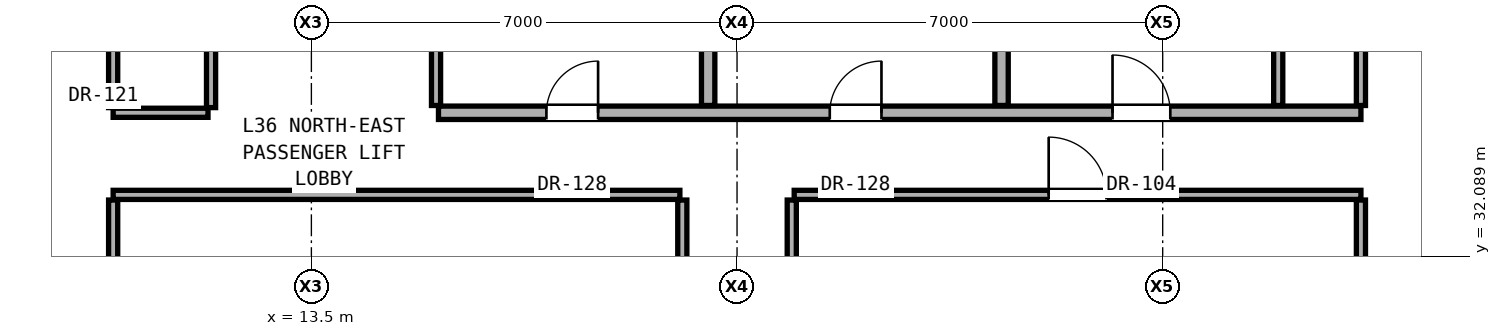
"""IFC4 building model, lengths in metres.
Left out: names, types, materials, properties, quantities, classifications, styles, units other than length and angle.
Written with IfcOpenShell. Run it as: python <this file> out.ifc"""

import sys

from ifc_helpers import new_model, si_unit, direction, frame, frame_2d, origin, place, context, subcontext, project, spatial, rectangle, extrude, element, fill, save


model = new_model("IFC4")
c1 = context("Model", 3, precision=1e-05, world=origin(), true_north=direction((0.0, 1.0)))
c2 = subcontext(c1, "Body", "Model", "MODEL_VIEW")
j1 = project(units=[si_unit("LENGTHUNIT", "METRE"), si_unit("PLANEANGLEUNIT", "RADIAN")], contexts=[c1])
p1 = place(None, origin())
s1 = spatial("IfcSite", under=j1, at=p1, CompositionType="ELEMENT")
p2 = place(p1, origin())
s2 = spatial("IfcBuilding", under=s1, at=p2, CompositionType="ELEMENT")
p3 = place(p2, frame((0.0, 0.0, 128.0)))
s3 = spatial("IfcBuildingStorey", under=s2, at=p3, CompositionType="ELEMENT", Elevation=128.0)
p4 = place(p3, frame((10.24, 33.1, 0.0), z_axis=(0.0, 0.0, 1.0), x_axis=(1.0, 0.0, 0.0)))
e1 = element("IfcWall", 1, at=p4, inside=s3, PredefinedType="PARTITIONING", context=c2, shape_type="SweptSolid", body=[
    extrude(rectangle(XDim=9.32, YDim=0.15, at=frame_2d((4.66, 0.0))), origin(), (0.0, 0.0, 1.0), 2.216),
])
p5 = place(p3, frame((21.44, 33.1, 0.0), z_axis=(0.0, 0.0, 1.0), x_axis=(1.0, 0.0, 0.0)))
e2 = element("IfcWall", 2, at=p5, inside=s3, PredefinedType="PARTITIONING", context=c2, shape_type="SweptSolid", body=[
    extrude(rectangle(XDim=9.32, YDim=0.15, at=frame_2d((4.66, 0.0))), origin(), (0.0, 0.0, 1.0), 2.216),
])
p6 = place(p5, frame((4.185, 0.0, 0.0)))
e3 = element("IfcOpeningElement", 3, at=p6, cuts=e2, PredefinedType="OPENING", context=c2, shape_type="SweptSolid", body=[
    extrude(rectangle(XDim=0.95, YDim=2.15, at=frame_2d((0.475, 1.075))), frame((0.0, 0.085, 0.0), z_axis=(0.0, -1.0, 0.0), x_axis=(1.0, 0.0, 0.0)), (0.0, 0.0, 1.0), 0.17),
])
p7 = place(p3, frame((10.24, 34.45, 0.0), z_axis=(0.0, 0.0, 1.0), x_axis=(1.0, 0.0, 0.0)))
e4 = element("IfcWall", 4, at=p7, inside=s3, PredefinedType="PARTITIONING", context=c2, shape_type="SweptSolid", body=[
    extrude(rectangle(XDim=1.56, YDim=0.15, at=frame_2d((0.78, 0.0))), origin(), (0.0, 0.0, 1.0), 2.216),
])
p8 = place(p3, frame((15.59, 34.45, 0.0), z_axis=(0.0, 0.0, 1.0), x_axis=(1.0, 0.0, 0.0)))
e5 = element("IfcWall", 5, at=p8, inside=s3, PredefinedType="SOLIDWALL", context=c2, shape_type="SweptSolid", body=[
    extrude(rectangle(XDim=15.17, YDim=0.22, at=frame_2d((7.585, 0.0))), origin(), (0.0, 0.0, 1.0), 2.216),
])
p9 = place(p8, frame((6.435, 0.0, 0.0)))
e6 = element("IfcOpeningElement", 6, at=p9, cuts=e5, PredefinedType="OPENING", context=c2, shape_type="SweptSolid", body=[
    extrude(rectangle(XDim=0.85, YDim=2.01, at=frame_2d((0.425, 1.005))), frame((0.0, 0.12, 0.0), z_axis=(0.0, -1.0, 0.0), x_axis=(1.0, 0.0, 0.0)), (0.0, 0.0, 1.0), 0.24),
])
p10 = place(p8, frame((11.085, 0.0, 0.0)))
e7 = element("IfcOpeningElement", 7, at=p10, cuts=e5, PredefinedType="OPENING", context=c2, shape_type="SweptSolid", body=[
    extrude(rectangle(XDim=0.95, YDim=2.15, at=frame_2d((0.475, 1.075))), frame((0.0, 0.12, 0.0), z_axis=(0.0, -1.0, 0.0), x_axis=(1.0, 0.0, 0.0)), (0.0, 0.0, 1.0), 0.24),
])
p11 = place(p8, frame((1.775, 0.0, 0.0)))
e8 = element("IfcOpeningElement", 8, at=p11, cuts=e5, PredefinedType="OPENING", context=c2, shape_type="SweptSolid", body=[
    extrude(rectangle(XDim=0.85, YDim=2.01, at=frame_2d((0.425, 1.005))), frame((0.0, 0.12, 0.0), z_axis=(0.0, -1.0, 0.0), x_axis=(1.0, 0.0, 0.0)), (0.0, 0.0, 1.0), 0.24),
])
p12 = place(p3, frame((10.24, 27.485, 0.0), z_axis=(0.0, 0.0, 1.0), x_axis=(0.0, 1.0, 0.0)))
e9 = element("IfcWall", 9, at=p12, inside=s3, PredefinedType="PARTITIONING", context=c2, shape_type="SweptSolid", body=[
    extrude(rectangle(XDim=5.53, YDim=0.15, at=frame_2d((2.765, 0.0))), origin(), (0.0, 0.0, 1.0), 2.299),
])
p13 = place(p12, frame((2.29, 0.0, 0.0)))
e10 = element("IfcOpeningElement", 10, at=p13, cuts=e9, PredefinedType="OPENING", context=c2, shape_type="SweptSolid", body=[
    extrude(rectangle(XDim=0.95, YDim=2.15, at=frame_2d((0.475, 1.075))), frame((0.0, 0.085, 0.0), z_axis=(0.0, -1.0, 0.0), x_axis=(1.0, 0.0, 0.0)), (0.0, 0.0, 1.0), 0.17),
])
p14 = place(p3, frame((10.24, 34.535, 0.0), z_axis=(0.0, 0.0, 1.0), x_axis=(0.0, 1.0, 0.0)))
e11 = element("IfcWall", 11, at=p14, inside=s3, PredefinedType="PARTITIONING", context=c2, shape_type="SweptSolid", body=[
    extrude(rectangle(XDim=9.13, YDim=0.15, at=frame_2d((4.565, 0.0))), origin(), (0.0, 0.0, 1.0), 2.456),
])
p15 = place(p3, frame((11.85, 34.535, 0.0), z_axis=(0.0, 0.0, 1.0), x_axis=(0.0, 1.0, 0.0)))
e12 = element("IfcWall", 12, at=p15, inside=s3, PredefinedType="PARTITIONING", context=c2, shape_type="SweptSolid", body=[
    extrude(rectangle(XDim=2.795, YDim=0.15, at=frame_2d((1.397, 0.0))), origin(), (0.0, 0.0, 1.0), 3.08),
])
p16 = place(p3, frame((15.55, 34.57, 0.0), z_axis=(0.0, 0.0, 1.0), x_axis=(0.0, 1.0, 0.0)))
e13 = element("IfcWall", 13, at=p16, inside=s3, PredefinedType="PARTITIONING", context=c2, shape_type="SweptSolid", body=[
    extrude(rectangle(XDim=2.76, YDim=0.15, at=frame_2d((1.38, 0.0))), origin(), (0.0, 0.0, 1.0), 2.609),
])
p17 = place(p3, frame((19.6, 27.485, 0.0), z_axis=(0.0, 0.0, 1.0), x_axis=(0.0, 1.0, 0.0)))
e14 = element("IfcWall", 14, at=p17, inside=s3, PredefinedType="PARTITIONING", context=c2, shape_type="SweptSolid", body=[
    extrude(rectangle(XDim=5.53, YDim=0.15, at=frame_2d((2.765, 0.0))), origin(), (0.0, 0.0, 1.0), 2.216),
])
p18 = place(p3, frame((20.025, 34.57, 0.0), z_axis=(0.0, 0.0, 1.0), x_axis=(0.0, 1.0, 0.0)))
e15 = element("IfcWall", 15, at=p18, inside=s3, PredefinedType="SOLIDWALL", context=c2, shape_type="SweptSolid", body=[
    extrude(rectangle(XDim=2.76, YDim=0.22, at=frame_2d((1.38, 0.0))), origin(), (0.0, 0.0, 1.0), 3.08),
])
p19 = place(p3, frame((21.4, 27.485, 0.0), z_axis=(0.0, 0.0, 1.0), x_axis=(0.0, 1.0, 0.0)))
e16 = element("IfcWall", 16, at=p19, inside=s3, PredefinedType="PARTITIONING", context=c2, shape_type="SweptSolid", body=[
    extrude(rectangle(XDim=5.53, YDim=0.15, at=frame_2d((2.765, 0.0))), origin(), (0.0, 0.0, 1.0), 2.216),
])
p20 = place(p3, frame((24.85, 34.57, 0.0), z_axis=(0.0, 0.0, 1.0), x_axis=(0.0, 1.0, 0.0)))
e17 = element("IfcWall", 17, at=p20, inside=s3, PredefinedType="SOLIDWALL", context=c2, shape_type="SweptSolid", body=[
    extrude(rectangle(XDim=2.76, YDim=0.22, at=frame_2d((1.38, 0.0))), origin(), (0.0, 0.0, 1.0), 3.08),
])
p21 = place(p3, frame((29.4, 34.57, 0.0), z_axis=(0.0, 0.0, 1.0), x_axis=(0.0, 1.0, 0.0)))
e18 = element("IfcWall", 18, at=p21, inside=s3, PredefinedType="PARTITIONING", context=c2, shape_type="SweptSolid", body=[
    extrude(rectangle(XDim=2.76, YDim=0.15, at=frame_2d((1.38, 0.0))), origin(), (0.0, 0.0, 1.0), 3.08),
])
p22 = place(p3, frame((30.76, 27.485, 0.0), z_axis=(0.0, 0.0, 1.0), x_axis=(0.0, 1.0, 0.0)))
e19 = element("IfcWall", 19, at=p22, inside=s3, PredefinedType="PARTITIONING", context=c2, shape_type="SweptSolid", body=[
    extrude(rectangle(XDim=5.53, YDim=0.15, at=frame_2d((2.765, 0.0))), origin(), (0.0, 0.0, 1.0), 2.299),
])
p23 = place(p3, frame((30.76, 34.57, 0.0), z_axis=(0.0, 0.0, 1.0), x_axis=(0.0, 1.0, 0.0)))
e20 = element("IfcWall", 20, at=p23, inside=s3, PredefinedType="PARTITIONING", context=c2, shape_type="SweptSolid", body=[
    extrude(rectangle(XDim=9.095, YDim=0.15, at=frame_2d((4.547, 0.0))), origin(), (0.0, 0.0, 1.0), 2.456),
])
p24 = place(p9, origin())
e21 = element("IfcDoor", 21, at=p24, inside=s3, OperationType="SINGLE_SWING_RIGHT", PredefinedType="DOOR", context=c2, shape_type="SweptSolid", body=[
    extrude(rectangle(XDim=0.85, YDim=2.01, at=frame_2d((0.425, 1.005))), frame((0.0, 0.025, 0.0), z_axis=(0.0, -1.0, 0.0), x_axis=(1.0, 0.0, 0.0)), (0.0, 0.0, 1.0), 0.05),
])
fill(e6, e21)
p25 = place(p10, origin())
e22 = element("IfcDoor", 22, at=p25, inside=s3, OperationType="SINGLE_SWING_LEFT", PredefinedType="DOOR", context=c2, shape_type="SweptSolid", body=[
    extrude(rectangle(XDim=0.95, YDim=2.15, at=frame_2d((0.475, 1.075))), frame((0.0, 0.025, 0.0), z_axis=(0.0, -1.0, 0.0), x_axis=(1.0, 0.0, 0.0)), (0.0, 0.0, 1.0), 0.05),
])
fill(e7, e22)
p26 = place(p11, origin())
e23 = element("IfcDoor", 23, at=p26, inside=s3, OperationType="SINGLE_SWING_RIGHT", PredefinedType="DOOR", context=c2, shape_type="SweptSolid", body=[
    extrude(rectangle(XDim=0.85, YDim=2.01, at=frame_2d((0.425, 1.005))), frame((0.0, 0.025, 0.0), z_axis=(0.0, -1.0, 0.0), x_axis=(1.0, 0.0, 0.0)), (0.0, 0.0, 1.0), 0.05),
])
fill(e8, e23)
p27 = place(p6, origin())
e24 = element("IfcDoor", 24, at=p27, inside=s3, OperationType="SINGLE_SWING_LEFT", PredefinedType="DOOR", context=c2, shape_type="SweptSolid", body=[
    extrude(rectangle(XDim=0.95, YDim=2.15, at=frame_2d((0.475, 1.075))), frame((0.0, 0.025, 0.0), z_axis=(0.0, -1.0, 0.0), x_axis=(1.0, 0.0, 0.0)), (0.0, 0.0, 1.0), 0.05),
])
fill(e3, e24)
save(model, sys.argv[1])
